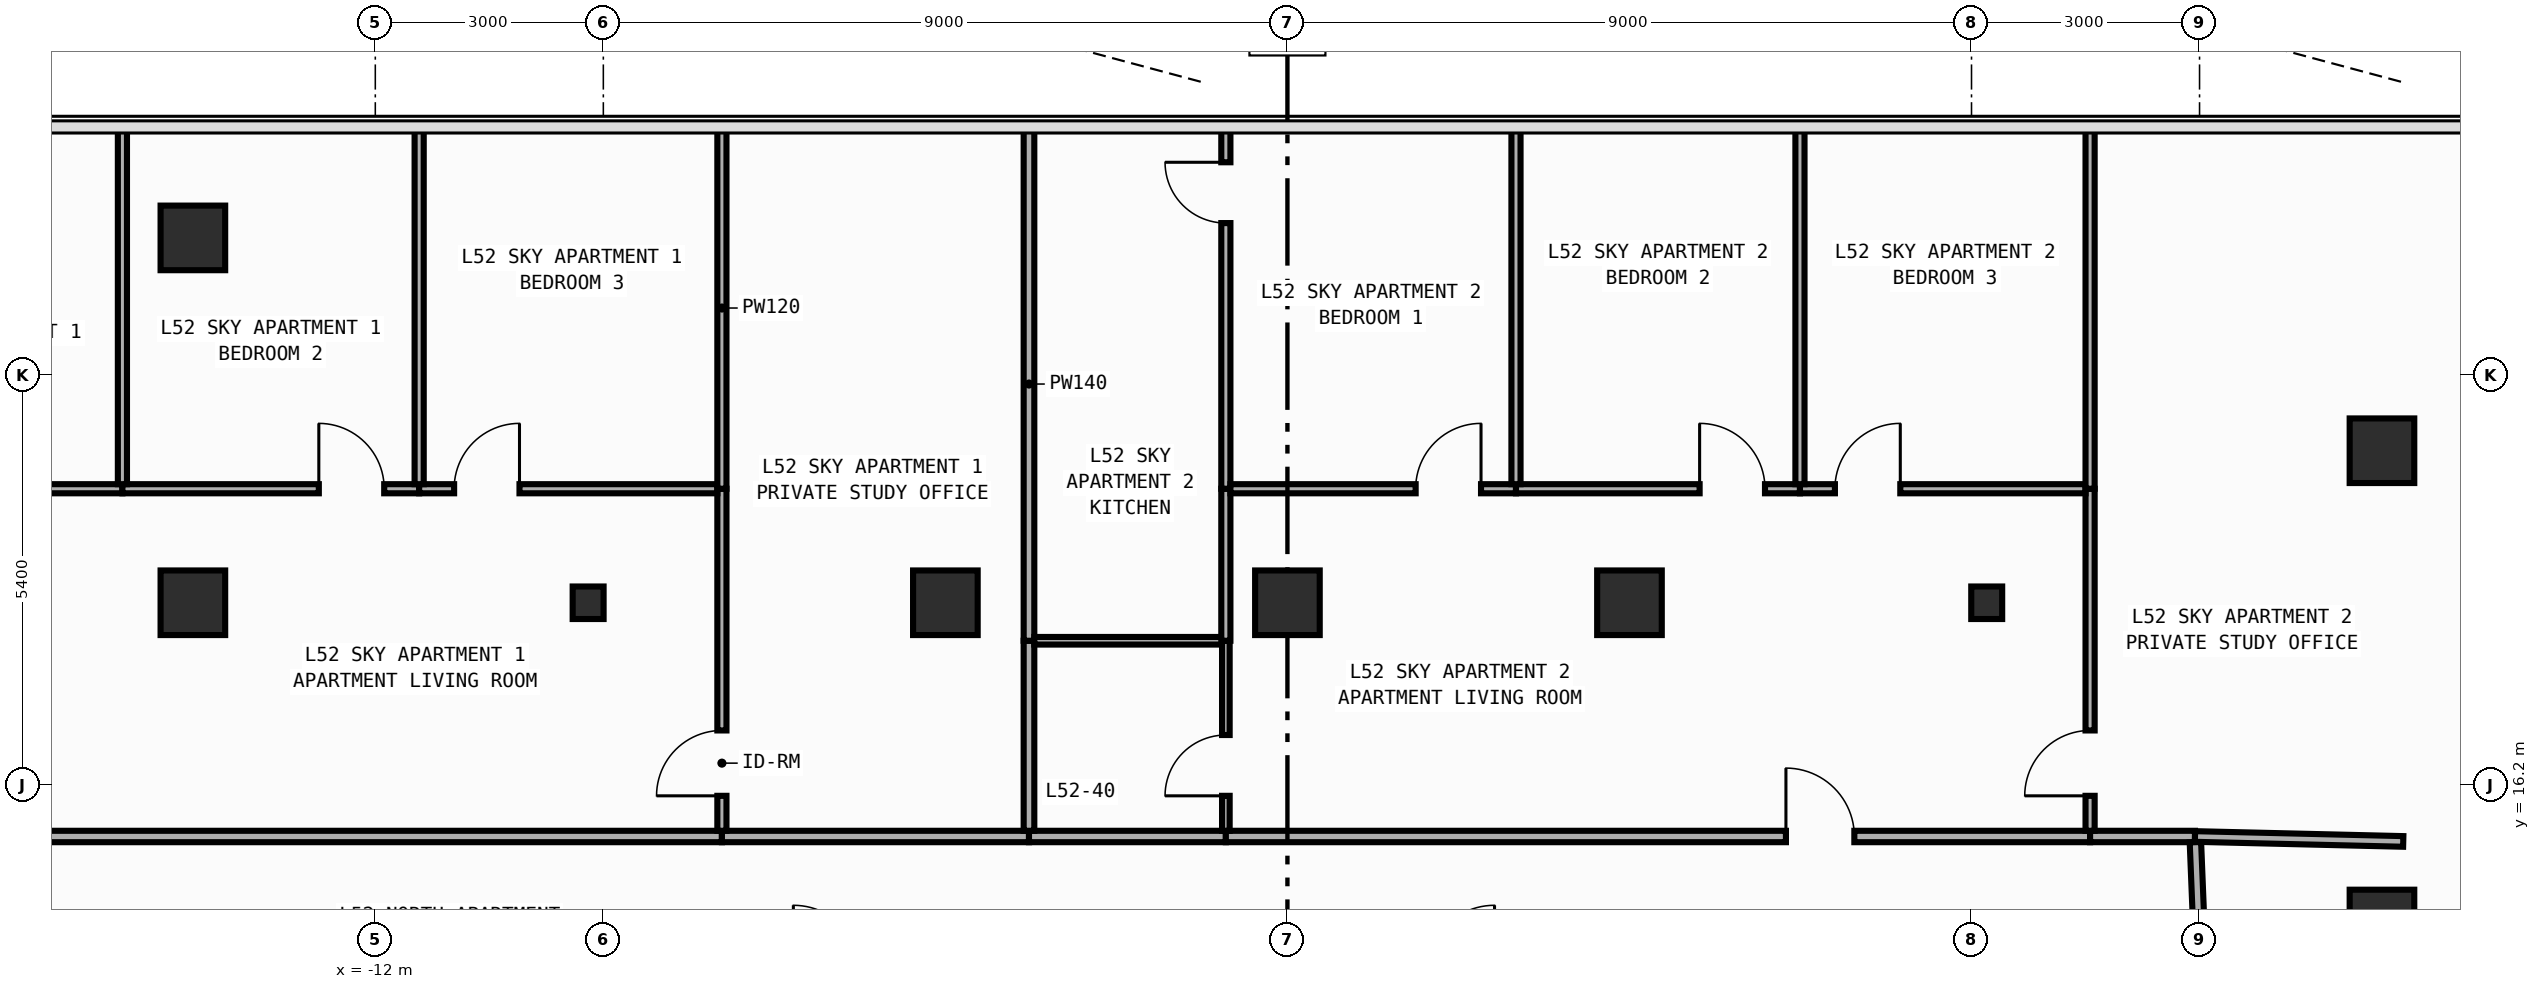
"""IFC4 building model, lengths in metres.
Left out: names, types, materials, properties, quantities, classifications, styles, units other than length and angle.
Written with IfcOpenShell. Run it as: python <this file> out.ifc"""

import sys

from ifc_helpers import new_model, si_unit, direction, frame, frame_2d, origin, origin_2d, place, context, subcontext, project, spatial, rectangle, i_section, extrude, element, fill, save


model = new_model("IFC4")
c1 = context("Model", 3, precision=1e-05, world=origin(), true_north=direction((0.0, 1.0)))
c2 = subcontext(c1, "Body", "Model", "MODEL_VIEW")
j1 = project(units=[si_unit("LENGTHUNIT", "METRE"), si_unit("PLANEANGLEUNIT", "RADIAN")], contexts=[c1])
p1 = place(None, origin())
s1 = spatial("IfcSite", under=j1, at=p1, CompositionType="ELEMENT")
p2 = place(p1, origin())
s2 = spatial("IfcBuilding", under=s1, at=p2, CompositionType="ELEMENT")
p3 = place(p2, frame((0.0, 0.0, 226.0)))
s3 = spatial("IfcBuildingStorey", under=s2, at=p3, CompositionType="ELEMENT", Elevation=226.0)
for number, where, z_axis, x_axis in (
    (1, (-9.2, 18.6, 0.0), (0.0, 0.0, 1.0), (1.0, 0.0, 0.0)),
    (2, (9.2, 18.6, 0.0), (0.0, 0.0, 1.0), (1.0, 0.0, 0.0)),
):
    element("IfcColumn", number, at=place(p3, frame(where, z_axis=z_axis, x_axis=x_axis)), inside=s3, PredefinedType="COLUMN", context=c2, shape_type="SweptSolid", body=[
        extrude(i_section(OverallWidth=0.407, OverallDepth=0.428, WebThickness=0.02, FlangeThickness=0.035, FilletRadius=0.022, at=origin_2d()), origin(), (0.0, 0.0, 1.0), 3.6),
    ])
for number, where, z_axis, x_axis in (
    (3, (-14.4, 18.6, 0.0), (0.0, 0.0, 1.0), (1.0, 0.0, 0.0)),
    (4, (14.4, 14.4, 0.0), (0.0, 0.0, 1.0), (1.0, 0.0, 0.0)),
    (5, (-4.5, 18.6, 0.0), (0.0, 0.0, 1.0), (1.0, 0.0, 0.0)),
    (6, (0.0, 18.6, 0.0), (0.0, 0.0, 1.0), (1.0, 0.0, 0.0)),
    (7, (4.5, 18.6, 0.0), (0.0, 0.0, 1.0), (1.0, 0.0, 0.0)),
    (8, (-14.4, 23.4, 0.0), (0.0, 0.0, 1.0), (1.0, 0.0, 0.0)),
    (9, (14.4, 20.6, 0.0), (0.0, 0.0, 1.0), (1.0, 0.0, 0.0)),
):
    element("IfcColumn", number, at=place(p3, frame(where, z_axis=z_axis, x_axis=x_axis)), inside=s3, PredefinedType="COLUMN", context=c2, shape_type="SweptSolid", body=[
        extrude(rectangle(XDim=0.85, YDim=0.85, at=origin_2d()), origin(), (0.0, 0.0, 1.0), 3.6),
    ])
p4 = place(p3, frame((-19.31, 15.525, 0.0), z_axis=(0.0, 0.0, 1.0), x_axis=(1.0, 0.0, 0.0)))
e10 = element("IfcWall", 10, at=p4, inside=s3, PredefinedType="PARTITIONING", context=c2, shape_type="SweptSolid", body=[
    extrude(rectangle(XDim=11.87, YDim=0.15, at=frame_2d((5.935, 0.0))), origin(), (0.0, 0.0, 1.0), 3.34),
])
p5 = place(p4, frame((1.465, 0.0, 0.0)))
e11 = element("IfcOpeningElement", 11, at=p5, cuts=e10, PredefinedType="OPENING", context=c2, shape_type="SweptSolid", body=[
    extrude(rectangle(XDim=0.9, YDim=2.15, at=frame_2d((0.45, 1.075))), frame((0.0, 0.085, 0.0), z_axis=(0.0, -1.0, 0.0), x_axis=(1.0, 0.0, 0.0)), (0.0, 0.0, 1.0), 0.17),
])
p6 = place(p3, frame((-7.44, 15.525, 0.0), z_axis=(0.0, 0.0, 1.0), x_axis=(1.0, 0.0, 0.0)))
e12 = element("IfcWall", 12, at=p6, inside=s3, PredefinedType="PARTITIONING", context=c2, shape_type="SweptSolid", body=[
    extrude(rectangle(XDim=4.04, YDim=0.15, at=frame_2d((2.02, 0.0))), origin(), (0.0, 0.0, 1.0), 3.34),
])
p7 = place(p3, frame((-3.4, 15.525, 0.0), z_axis=(0.0, 0.0, 1.0), x_axis=(1.0, 0.0, 0.0)))
e13 = element("IfcWall", 13, at=p7, inside=s3, PredefinedType="PARTITIONING", context=c2, shape_type="SweptSolid", body=[
    extrude(rectangle(XDim=2.59, YDim=0.15, at=frame_2d((1.295, 0.0))), origin(), (0.0, 0.0, 1.0), 3.34),
])
p8 = place(p3, frame((-0.81, 15.525, 0.0), z_axis=(0.0, 0.0, 1.0), x_axis=(1.0, 0.0, 0.0)))
e14 = element("IfcWall", 14, at=p8, inside=s3, PredefinedType="PARTITIONING", context=c2, shape_type="SweptSolid", body=[
    extrude(rectangle(XDim=11.37, YDim=0.15, at=frame_2d((5.685, 0.0))), origin(), (0.0, 0.0, 1.0), 3.34),
])
p9 = place(p8, frame((7.368, 0.0, 0.0)))
e15 = element("IfcOpeningElement", 15, at=p9, cuts=e14, PredefinedType="OPENING", context=c2, shape_type="SweptSolid", body=[
    extrude(rectangle(XDim=0.9, YDim=2.15, at=frame_2d((0.45, 1.075))), frame((0.0, 0.085, 0.0), z_axis=(0.0, -1.0, 0.0), x_axis=(1.0, 0.0, 0.0)), (0.0, 0.0, 1.0), 0.17),
])
p10 = place(p3, frame((10.56, 15.525, 0.0), z_axis=(0.0, 0.0, 1.0), x_axis=(1.0, 0.0, 0.0)))
e16 = element("IfcWall", 16, at=p10, inside=s3, PredefinedType="PARTITIONING", context=c2, shape_type="SweptSolid", body=[
    extrude(rectangle(XDim=1.38, YDim=0.15, at=frame_2d((0.69, 0.0))), origin(), (0.0, 0.0, 1.0), 3.34),
])
p11 = place(p3, frame((12.015, 13.72, 0.0), z_axis=(0.0, 0.0, 1.0), x_axis=(-0.040046877756, 0.99919780203, 0.0)))
e17 = element("IfcWall", 17, at=p11, inside=s3, PredefinedType="PARTITIONING", context=c2, shape_type="SweptSolid", body=[
    extrude(rectangle(XDim=1.731, YDim=0.15, at=frame_2d((0.866, 0.0))), origin(), (0.0, 0.0, 1.0), 3.34),
])
p12 = place(p3, frame((-7.44, 15.6, 0.0), z_axis=(0.0, 0.0, 1.0), x_axis=(0.0, 1.0, 0.0)))
e18 = element("IfcWall", 18, at=p12, inside=s3, PredefinedType="PARTITIONING", context=c2, shape_type="SweptSolid", body=[
    extrude(rectangle(XDim=4.5, YDim=0.12, at=frame_2d((2.25, 0.0))), origin(), (0.0, 0.0, 1.0), 3.34),
])
p13 = place(p12, frame((0.46, 0.0, 0.0)))
e19 = element("IfcOpeningElement", 19, at=p13, cuts=e18, PredefinedType="OPENING", context=c2, shape_type="SweptSolid", body=[
    extrude(rectangle(XDim=0.86, YDim=2.15, at=frame_2d((0.43, 1.075))), frame((0.0, 0.07, 0.0), z_axis=(0.0, -1.0, 0.0), x_axis=(1.0, 0.0, 0.0)), (0.0, 0.0, 1.0), 0.14),
])
p14 = place(p3, frame((-19.25, 20.1, 0.0), z_axis=(0.0, 0.0, 1.0), x_axis=(1.0, 0.0, 0.0)))
e20 = element("IfcWall", 20, at=p14, inside=s3, PredefinedType="PARTITIONING", context=c2, shape_type="SweptSolid", body=[
    extrude(rectangle(XDim=3.923, YDim=0.12, at=frame_2d((1.961, 0.0))), origin(), (0.0, 0.0, 1.0), 3.34),
])
p15 = place(p14, frame((1.317, 0.0, 0.0)))
e21 = element("IfcOpeningElement", 21, at=p15, cuts=e20, PredefinedType="OPENING", context=c2, shape_type="SweptSolid", body=[
    extrude(rectangle(XDim=0.86, YDim=2.15, at=frame_2d((0.43, 1.075))), frame((0.0, 0.07, 0.0), z_axis=(0.0, -1.0, 0.0), x_axis=(1.0, 0.0, 0.0)), (0.0, 0.0, 1.0), 0.14),
])
p16 = place(p3, frame((-15.327, 20.1, 0.0), z_axis=(0.0, 0.0, 1.0), x_axis=(1.0, 0.0, 0.0)))
e22 = element("IfcWall", 22, at=p16, inside=s3, PredefinedType="PARTITIONING", context=c2, shape_type="SweptSolid", body=[
    extrude(rectangle(XDim=3.904, YDim=0.12, at=frame_2d((1.952, 0.0))), origin(), (0.0, 0.0, 1.0), 3.34),
])
p17 = place(p16, frame((2.584, 0.0, 0.0)))
e23 = element("IfcOpeningElement", 23, at=p17, cuts=e22, PredefinedType="OPENING", context=c2, shape_type="SweptSolid", body=[
    extrude(rectangle(XDim=0.86, YDim=2.15, at=frame_2d((0.43, 1.075))), frame((0.0, 0.07, 0.0), z_axis=(0.0, -1.0, 0.0), x_axis=(1.0, 0.0, 0.0)), (0.0, 0.0, 1.0), 0.14),
])
p18 = place(p3, frame((-11.423, 20.1, 0.0), z_axis=(0.0, 0.0, 1.0), x_axis=(1.0, 0.0, 0.0)))
e24 = element("IfcWall", 24, at=p18, inside=s3, PredefinedType="PARTITIONING", context=c2, shape_type="SweptSolid", body=[
    extrude(rectangle(XDim=3.923, YDim=0.12, at=frame_2d((1.961, 0.0))), origin(), (0.0, 0.0, 1.0), 3.34),
])
p19 = place(p18, frame((0.46, 0.0, 0.0)))
e25 = element("IfcOpeningElement", 25, at=p19, cuts=e24, PredefinedType="OPENING", context=c2, shape_type="SweptSolid", body=[
    extrude(rectangle(XDim=0.86, YDim=2.15, at=frame_2d((0.43, 1.075))), frame((0.0, 0.07, 0.0), z_axis=(0.0, -1.0, 0.0), x_axis=(1.0, 0.0, 0.0)), (0.0, 0.0, 1.0), 0.14),
])
p20 = place(p3, frame((-7.44, 20.1, 0.0), z_axis=(0.0, 0.0, 1.0), x_axis=(0.0, 1.0, 0.0)))
e26 = element("IfcWall", 26, at=p20, inside=s3, PredefinedType="PARTITIONING", context=c2, shape_type="SweptSolid", body=[
    extrude(rectangle(XDim=4.755, YDim=0.12, at=frame_2d((2.377, 0.0))), origin(), (0.0, 0.0, 1.0), 3.34),
])
p21 = place(p3, frame((-3.4, 15.6, 0.0), z_axis=(0.0, 0.0, 1.0), x_axis=(0.0, 1.0, 0.0)))
e27 = element("IfcWall", 27, at=p21, inside=s3, PredefinedType="PARTITIONING", context=c2, shape_type="SweptSolid", body=[
    extrude(rectangle(XDim=2.5, YDim=0.14, at=frame_2d((1.25, 0.0))), origin(), (0.0, 0.0, 1.0), 3.34),
])
p22 = place(p3, frame((-3.4, 18.1, 0.0), z_axis=(0.0, 0.0, 1.0), x_axis=(0.0, 1.0, 0.0)))
e28 = element("IfcWall", 28, at=p22, inside=s3, PredefinedType="PARTITIONING", context=c2, shape_type="SweptSolid", body=[
    extrude(rectangle(XDim=6.755, YDim=0.14, at=frame_2d((3.377, 0.0))), origin(), (0.0, 0.0, 1.0), 3.34),
])
for number, where, z_axis, x_axis in (
    (29, (-15.327, 20.16, 0.0), (0.0, 0.0, 1.0), (0.0, 1.0, 0.0)),
    (30, (-11.423, 20.16, 0.0), (0.0, 0.0, 1.0), (0.0, 1.0, 0.0)),
):
    element("IfcWall", number, at=place(p3, frame(where, z_axis=z_axis, x_axis=x_axis)), inside=s3, PredefinedType="PARTITIONING", context=c2, shape_type="SweptSolid", body=[
        extrude(rectangle(XDim=4.695, YDim=0.12, at=frame_2d((2.348, 0.0))), origin(), (0.0, 0.0, 1.0), 3.34),
    ])
p23 = place(p3, frame((-3.33, 18.1, 0.0), z_axis=(0.0, 0.0, 1.0), x_axis=(1.0, 0.0, 0.0)))
e31 = element("IfcWall", 31, at=p23, inside=s3, PredefinedType="PARTITIONING", context=c2, shape_type="SweptSolid", body=[
    extrude(rectangle(XDim=2.47, YDim=0.1, at=frame_2d((1.235, 0.0))), origin(), (0.0, 0.0, 1.0), 3.34),
])
p24 = place(p3, frame((-0.81, 15.6, 0.0), z_axis=(0.0, 0.0, 1.0), x_axis=(0.0, 1.0, 0.0)))
e32 = element("IfcWall", 32, at=p24, inside=s3, PredefinedType="PARTITIONING", context=c2, shape_type="SweptSolid", body=[
    extrude(rectangle(XDim=2.5, YDim=0.1, at=frame_2d((1.25, 0.0))), origin(), (0.0, 0.0, 1.0), 3.34),
])
p25 = place(p24, frame((0.46, 0.0, 0.0)))
e33 = element("IfcOpeningElement", 33, at=p25, cuts=e32, PredefinedType="OPENING", context=c2, shape_type="SweptSolid", body=[
    extrude(rectangle(XDim=0.8, YDim=2.1, at=frame_2d((0.4, 1.05))), frame((0.0, 0.06, 0.0), z_axis=(0.0, -1.0, 0.0), x_axis=(1.0, 0.0, 0.0)), (0.0, 0.0, 1.0), 0.12),
])
p26 = place(p3, frame((-0.81, 18.1, 0.0), z_axis=(0.0, 0.0, 1.0), x_axis=(0.0, 1.0, 0.0)))
e34 = element("IfcWall", 34, at=p26, inside=s3, PredefinedType="PARTITIONING", context=c2, shape_type="SweptSolid", body=[
    extrude(rectangle(XDim=2.0, YDim=0.12, at=frame_2d((1.0, 0.0))), origin(), (0.0, 0.0, 1.0), 3.34),
])
p27 = place(p3, frame((-0.81, 20.1, 0.0), z_axis=(0.0, 0.0, 1.0), x_axis=(0.0, 1.0, 0.0)))
e35 = element("IfcWall", 35, at=p27, inside=s3, PredefinedType="PARTITIONING", context=c2, shape_type="SweptSolid", body=[
    extrude(rectangle(XDim=4.755, YDim=0.12, at=frame_2d((2.377, 0.0))), origin(), (0.0, 0.0, 1.0), 3.34),
])
p28 = place(p27, frame((3.495, 0.0, 0.0)))
e36 = element("IfcOpeningElement", 36, at=p28, cuts=e35, PredefinedType="OPENING", context=c2, shape_type="SweptSolid", body=[
    extrude(rectangle(XDim=0.8, YDim=2.1, at=frame_2d((0.4, 1.05))), frame((0.0, 0.07, 0.0), z_axis=(0.0, -1.0, 0.0), x_axis=(1.0, 0.0, 0.0)), (0.0, 0.0, 1.0), 0.14),
])
p29 = place(p3, frame((10.56, 15.6, 0.0), z_axis=(0.0, 0.0, 1.0), x_axis=(0.0, 1.0, 0.0)))
e37 = element("IfcWall", 37, at=p29, inside=s3, PredefinedType="PARTITIONING", context=c2, shape_type="SweptSolid", body=[
    extrude(rectangle(XDim=4.5, YDim=0.12, at=frame_2d((2.25, 0.0))), origin(), (0.0, 0.0, 1.0), 3.34),
])
p30 = place(p29, frame((0.46, 0.0, 0.0)))
e38 = element("IfcOpeningElement", 38, at=p30, cuts=e37, PredefinedType="OPENING", context=c2, shape_type="SweptSolid", body=[
    extrude(rectangle(XDim=0.86, YDim=2.15, at=frame_2d((0.43, 1.075))), frame((0.0, 0.07, 0.0), z_axis=(0.0, -1.0, 0.0), x_axis=(1.0, 0.0, 0.0)), (0.0, 0.0, 1.0), 0.14),
])
p31 = place(p3, frame((-0.75, 20.1, 0.0), z_axis=(0.0, 0.0, 1.0), x_axis=(1.0, 0.0, 0.0)))
e39 = element("IfcWall", 39, at=p31, inside=s3, PredefinedType="PARTITIONING", context=c2, shape_type="SweptSolid", body=[
    extrude(rectangle(XDim=3.757, YDim=0.12, at=frame_2d((1.878, 0.0))), origin(), (0.0, 0.0, 1.0), 3.34),
])
p32 = place(p31, frame((2.437, 0.0, 0.0)))
e40 = element("IfcOpeningElement", 40, at=p32, cuts=e39, PredefinedType="OPENING", context=c2, shape_type="SweptSolid", body=[
    extrude(rectangle(XDim=0.86, YDim=2.15, at=frame_2d((0.43, 1.075))), frame((0.0, 0.07, 0.0), z_axis=(0.0, -1.0, 0.0), x_axis=(1.0, 0.0, 0.0)), (0.0, 0.0, 1.0), 0.14),
])
p33 = place(p3, frame((3.007, 20.1, 0.0), z_axis=(0.0, 0.0, 1.0), x_axis=(1.0, 0.0, 0.0)))
e41 = element("IfcWall", 41, at=p33, inside=s3, PredefinedType="PARTITIONING", context=c2, shape_type="SweptSolid", body=[
    extrude(rectangle(XDim=3.736, YDim=0.12, at=frame_2d((1.868, 0.0))), origin(), (0.0, 0.0, 1.0), 3.34),
])
p34 = place(p33, frame((2.416, 0.0, 0.0)))
e42 = element("IfcOpeningElement", 42, at=p34, cuts=e41, PredefinedType="OPENING", context=c2, shape_type="SweptSolid", body=[
    extrude(rectangle(XDim=0.86, YDim=2.15, at=frame_2d((0.43, 1.075))), frame((0.0, 0.07, 0.0), z_axis=(0.0, -1.0, 0.0), x_axis=(1.0, 0.0, 0.0)), (0.0, 0.0, 1.0), 0.14),
])
p35 = place(p3, frame((6.743, 20.1, 0.0), z_axis=(0.0, 0.0, 1.0), x_axis=(1.0, 0.0, 0.0)))
e43 = element("IfcWall", 43, at=p35, inside=s3, PredefinedType="PARTITIONING", context=c2, shape_type="SweptSolid", body=[
    extrude(rectangle(XDim=3.757, YDim=0.12, at=frame_2d((1.878, 0.0))), origin(), (0.0, 0.0, 1.0), 3.34),
])
p36 = place(p35, frame((0.46, 0.0, 0.0)))
e44 = element("IfcOpeningElement", 44, at=p36, cuts=e43, PredefinedType="OPENING", context=c2, shape_type="SweptSolid", body=[
    extrude(rectangle(XDim=0.86, YDim=2.15, at=frame_2d((0.43, 1.075))), frame((0.0, 0.07, 0.0), z_axis=(0.0, -1.0, 0.0), x_axis=(1.0, 0.0, 0.0)), (0.0, 0.0, 1.0), 0.14),
])
p37 = place(p3, frame((10.56, 20.1, 0.0), z_axis=(0.0, 0.0, 1.0), x_axis=(0.0, 1.0, 0.0)))
e45 = element("IfcWall", 45, at=p37, inside=s3, PredefinedType="PARTITIONING", context=c2, shape_type="SweptSolid", body=[
    extrude(rectangle(XDim=4.755, YDim=0.12, at=frame_2d((2.377, 0.0))), origin(), (0.0, 0.0, 1.0), 3.34),
])
p38 = place(p3, frame((11.94, 15.525, 0.0), z_axis=(0.0, 0.0, 1.0), x_axis=(0.999719241816, -0.023694673289, 0.0)))
e46 = element("IfcWall", 46, at=p38, inside=s3, PredefinedType="PARTITIONING", context=c2, shape_type="SweptSolid", body=[
    extrude(rectangle(XDim=2.741, YDim=0.14, at=frame_2d((1.37, 0.0))), origin(), (0.0, 0.0, 1.0), 3.34),
])
for number, where, z_axis, x_axis in (
    (47, (3.007, 20.16, 0.0), (0.0, 0.0, 1.0), (0.0, 1.0, 0.0)),
    (48, (6.743, 20.16, 0.0), (0.0, 0.0, 1.0), (0.0, 1.0, 0.0)),
):
    element("IfcWall", number, at=place(p3, frame(where, z_axis=z_axis, x_axis=x_axis)), inside=s3, PredefinedType="PARTITIONING", context=c2, shape_type="SweptSolid", body=[
        extrude(rectangle(XDim=4.695, YDim=0.12, at=frame_2d((2.348, 0.0))), origin(), (0.0, 0.0, 1.0), 3.34),
    ])
p39 = place(p9, origin())
e49 = element("IfcDoor", 49, at=p39, inside=s3, OperationType="SINGLE_SWING_LEFT", PredefinedType="DOOR", context=c2, shape_type="SweptSolid", body=[
    extrude(rectangle(XDim=0.9, YDim=2.15, at=frame_2d((0.45, 1.075))), frame((0.0, 0.025, 0.0), z_axis=(0.0, -1.0, 0.0), x_axis=(1.0, 0.0, 0.0)), (0.0, 0.0, 1.0), 0.05),
])
fill(e15, e49)
p40 = place(p13, origin())
e50 = element("IfcDoor", 50, at=p40, inside=s3, OperationType="SINGLE_SWING_LEFT", PredefinedType="DOOR", context=c2, shape_type="SweptSolid", body=[
    extrude(rectangle(XDim=0.86, YDim=2.15, at=frame_2d((0.43, 1.075))), frame((0.0, 0.025, 0.0), z_axis=(0.0, -1.0, 0.0), x_axis=(1.0, 0.0, 0.0)), (0.0, 0.0, 1.0), 0.05),
])
fill(e19, e50)
p41 = place(p17, origin())
e51 = element("IfcDoor", 51, at=p41, inside=s3, OperationType="SINGLE_SWING_LEFT", PredefinedType="DOOR", context=c2, shape_type="SweptSolid", body=[
    extrude(rectangle(XDim=0.86, YDim=2.15, at=frame_2d((0.43, 1.075))), frame((0.0, 0.025, 0.0), z_axis=(0.0, -1.0, 0.0), x_axis=(1.0, 0.0, 0.0)), (0.0, 0.0, 1.0), 0.05),
])
fill(e23, e51)
p42 = place(p19, origin())
e52 = element("IfcDoor", 52, at=p42, inside=s3, OperationType="SINGLE_SWING_RIGHT", PredefinedType="DOOR", context=c2, shape_type="SweptSolid", body=[
    extrude(rectangle(XDim=0.86, YDim=2.15, at=frame_2d((0.43, 1.075))), frame((0.0, 0.025, 0.0), z_axis=(0.0, -1.0, 0.0), x_axis=(1.0, 0.0, 0.0)), (0.0, 0.0, 1.0), 0.05),
])
fill(e25, e52)
p43 = place(p25, origin())
e53 = element("IfcDoor", 53, at=p43, inside=s3, OperationType="SINGLE_SWING_LEFT", PredefinedType="DOOR", context=c2, shape_type="SweptSolid", body=[
    extrude(rectangle(XDim=0.8, YDim=2.1, at=frame_2d((0.4, 1.05))), frame((0.0, 0.025, 0.0), z_axis=(0.0, -1.0, 0.0), x_axis=(1.0, 0.0, 0.0)), (0.0, 0.0, 1.0), 0.05),
])
fill(e33, e53)
p44 = place(p30, origin())
e54 = element("IfcDoor", 54, at=p44, inside=s3, OperationType="SINGLE_SWING_LEFT", PredefinedType="DOOR", context=c2, shape_type="SweptSolid", body=[
    extrude(rectangle(XDim=0.86, YDim=2.15, at=frame_2d((0.43, 1.075))), frame((0.0, 0.025, 0.0), z_axis=(0.0, -1.0, 0.0), x_axis=(1.0, 0.0, 0.0)), (0.0, 0.0, 1.0), 0.05),
])
fill(e38, e54)
p45 = place(p32, origin())
e55 = element("IfcDoor", 55, at=p45, inside=s3, OperationType="SINGLE_SWING_RIGHT", PredefinedType="DOOR", context=c2, shape_type="SweptSolid", body=[
    extrude(rectangle(XDim=0.86, YDim=2.15, at=frame_2d((0.43, 1.075))), frame((0.0, 0.025, 0.0), z_axis=(0.0, -1.0, 0.0), x_axis=(1.0, 0.0, 0.0)), (0.0, 0.0, 1.0), 0.05),
])
fill(e40, e55)
p46 = place(p34, origin())
e56 = element("IfcDoor", 56, at=p46, inside=s3, OperationType="SINGLE_SWING_LEFT", PredefinedType="DOOR", context=c2, shape_type="SweptSolid", body=[
    extrude(rectangle(XDim=0.86, YDim=2.15, at=frame_2d((0.43, 1.075))), frame((0.0, 0.025, 0.0), z_axis=(0.0, -1.0, 0.0), x_axis=(1.0, 0.0, 0.0)), (0.0, 0.0, 1.0), 0.05),
])
fill(e42, e56)
p47 = place(p36, origin())
e57 = element("IfcDoor", 57, at=p47, inside=s3, OperationType="SINGLE_SWING_RIGHT", PredefinedType="DOOR", context=c2, shape_type="SweptSolid", body=[
    extrude(rectangle(XDim=0.86, YDim=2.15, at=frame_2d((0.43, 1.075))), frame((0.0, 0.025, 0.0), z_axis=(0.0, -1.0, 0.0), x_axis=(1.0, 0.0, 0.0)), (0.0, 0.0, 1.0), 0.05),
])
fill(e44, e57)
p48 = place(p28, origin())
e58 = element("IfcDoor", 58, at=p48, inside=s3, OperationType="SINGLE_SWING_RIGHT", PredefinedType="DOOR", context=c2, shape_type="SweptSolid", body=[
    extrude(rectangle(XDim=0.8, YDim=2.1, at=frame_2d((0.4, 1.05))), frame((0.0, 0.025, 0.0), z_axis=(0.0, -1.0, 0.0), x_axis=(1.0, 0.0, 0.0)), (0.0, 0.0, 1.0), 0.05),
])
fill(e36, e58)
save(model, sys.argv[1])
